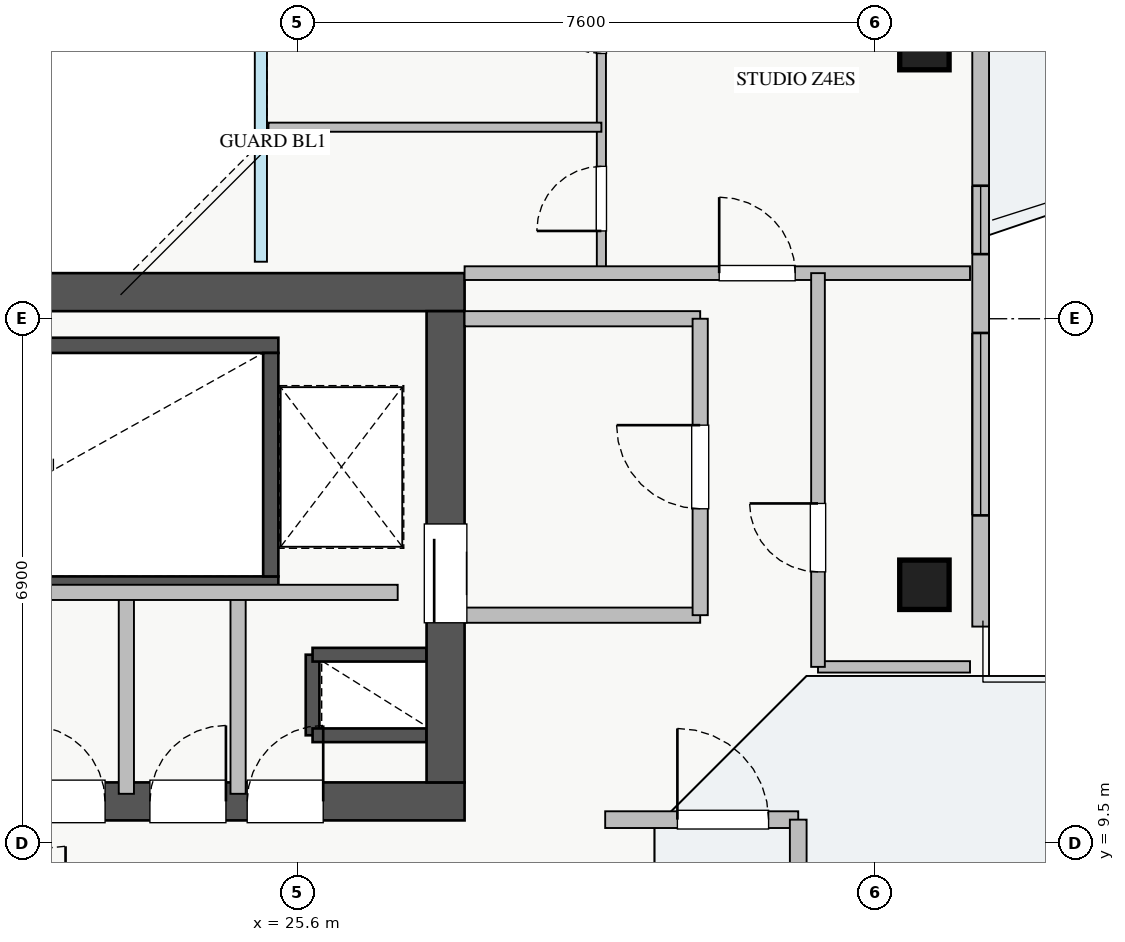
"""IFC4 building model, lengths in metres.
Left out: names, types, materials, properties, quantities, classifications, styles, units other than length and angle.
Written with IfcOpenShell. Run it as: python <this file> out.ifc"""

import sys

from ifc_helpers import new_model, si_unit, direction, frame, frame_2d, origin, origin_2d, place, context, subcontext, project, spatial, rectangle, extrude, source, transform, mapped, element, fill, save


model = new_model("IFC4")
c1 = context("Model", 3, precision=1e-05, world=origin(), true_north=direction((0.0, 1.0)))
c2 = subcontext(c1, "Body", "Model", "MODEL_VIEW")
j1 = project(units=[si_unit("LENGTHUNIT", "METRE"), si_unit("PLANEANGLEUNIT", "RADIAN")], contexts=[c1])
p1 = place(None, origin())
s1 = spatial("IfcSite", under=j1, at=p1, CompositionType="ELEMENT")
p2 = place(p1, origin())
s2 = spatial("IfcBuilding", under=s1, at=p2, CompositionType="ELEMENT")
p3 = place(p2, frame((0.0, 0.0, 253.5)))
s3 = spatial("IfcBuildingStorey", under=s2, at=p3, CompositionType="ELEMENT", Elevation=253.5)
p4 = place(p3, frame((25.8, 10.92, 0.0), z_axis=(0.0, 0.0, 1.0), x_axis=(0.0, 1.0, 0.0)))
e1 = element("IfcWall", 1, at=p4, inside=s3, PredefinedType="SHEAR", context=c2, shape_type="SweptSolid", body=[
    extrude(rectangle(XDim=1.06, YDim=0.18, at=frame_2d((0.53, 0.0))), origin(), (0.0, 0.0, 1.0), 3.07),
])
for number, where, z_axis, x_axis in (
    (2, (25.8, 11.98, 0.0), (0.0, 0.0, 1.0), (1.0, 0.0, 0.0)),
    (3, (25.8, 10.92, 0.0), (0.0, 0.0, 1.0), (1.0, 0.0, 0.0)),
):
    element("IfcWall", number, at=place(p3, frame(where, z_axis=z_axis, x_axis=x_axis)), inside=s3, PredefinedType="SHEAR", context=c2, shape_type="SweptSolid", body=[
        extrude(rectangle(XDim=1.5, YDim=0.18, at=frame_2d((0.75, 0.0))), origin(), (0.0, 0.0, 1.0), 3.07),
    ])
p5 = place(p3, frame((18.2, 12.91, 0.0), z_axis=(0.0, 0.0, 1.0), x_axis=(1.0, 0.0, 0.0)))
e4 = element("IfcWall", 4, at=p5, inside=s3, PredefinedType="SHEAR", context=c2, shape_type="SweptSolid", body=[
    extrude(rectangle(XDim=7.15, YDim=0.2, at=frame_2d((3.575, 0.0))), origin(), (0.0, 0.0, 1.0), 3.25),
])
p6 = place(p5, frame((0.35, 0.0, 0.0)))
e5 = element("IfcOpeningElement", 5, at=p6, cuts=e4, PredefinedType="OPENING", context=c2, shape_type="SweptSolid", body=[
    extrude(rectangle(XDim=1.1, YDim=2.05, at=frame_2d((0.55, 1.025))), frame((0.0, 0.11, 0.0), z_axis=(0.0, -1.0, 0.0), x_axis=(1.0, 0.0, 0.0)), (0.0, 0.0, 1.0), 0.22),
])
p7 = place(p3, frame((18.2, 16.05, 0.0), z_axis=(0.0, 0.0, 1.0), x_axis=(1.0, 0.0, 0.0)))
e6 = element("IfcWall", 6, at=p7, inside=s3, PredefinedType="SHEAR", context=c2, shape_type="SweptSolid", body=[
    extrude(rectangle(XDim=7.15, YDim=0.2, at=frame_2d((3.575, 0.0))), origin(), (0.0, 0.0, 1.0), 3.25),
])
p8 = place(p3, frame((25.25, 13.01, 0.0), z_axis=(0.0, 0.0, 1.0), x_axis=(0.0, 1.0, 0.0)))
e7 = element("IfcWall", 7, at=p8, inside=s3, PredefinedType="SHEAR", context=c2, shape_type="SweptSolid", body=[
    extrude(rectangle(XDim=2.94, YDim=0.2, at=frame_2d((1.47, 0.0))), origin(), (0.0, 0.0, 1.0), 3.25),
])
p9 = place(p3, frame((10.2, 10.05, 0.0), z_axis=(0.0, 0.0, 1.0), x_axis=(1.0, 0.0, 0.0)))
e8 = element("IfcWall", 8, at=p9, inside=s3, PredefinedType="SHEAR", context=c2, shape_type="SweptSolid", body=[
    extrude(rectangle(XDim=17.6, YDim=0.5, at=frame_2d((8.8, 0.0))), origin(), (0.0, 0.0, 1.0), 3.25),
])
p10 = place(p9, frame((1.15, 0.0, 0.0)))
e9 = element("IfcOpeningElement", 9, at=p10, cuts=e8, PredefinedType="OPENING", context=c2, shape_type="SweptSolid", body=[
    extrude(rectangle(XDim=1.1, YDim=2.05, at=frame_2d((0.55, 1.025))), frame((0.0, 0.26, 0.0), z_axis=(0.0, -1.0, 0.0), x_axis=(1.0, 0.0, 0.0)), (0.0, 0.0, 1.0), 0.52),
])
p11 = place(p9, frame((8.3, 0.0, 0.0)))
e10 = element("IfcOpeningElement", 10, at=p11, cuts=e8, PredefinedType="OPENING", context=c2, shape_type="SweptSolid", body=[
    extrude(rectangle(XDim=1.1, YDim=2.05, at=frame_2d((0.55, 1.025))), frame((0.0, 0.26, 0.0), z_axis=(0.0, -1.0, 0.0), x_axis=(1.0, 0.0, 0.0)), (0.0, 0.0, 1.0), 0.52),
])
p12 = place(p9, frame((2.85, 0.0, 0.0)))
e11 = element("IfcOpeningElement", 11, at=p12, cuts=e8, PredefinedType="OPENING", context=c2, shape_type="SweptSolid", body=[
    extrude(rectangle(XDim=1.1, YDim=2.05, at=frame_2d((0.55, 1.025))), frame((0.0, 0.26, 0.0), z_axis=(0.0, -1.0, 0.0), x_axis=(1.0, 0.0, 0.0)), (0.0, 0.0, 1.0), 0.52),
])
p13 = place(p9, frame((5.8, 0.0, 0.0)))
e12 = element("IfcOpeningElement", 12, at=p13, cuts=e8, PredefinedType="OPENING", context=c2, shape_type="SweptSolid", body=[
    extrude(rectangle(XDim=1.0, YDim=2.05, at=frame_2d((0.5, 1.025))), frame((0.0, 0.26, 0.0), z_axis=(0.0, -1.0, 0.0), x_axis=(1.0, 0.0, 0.0)), (0.0, 0.0, 1.0), 0.52),
])
p14 = place(p9, frame((14.74, 0.0, 0.0)))
e13 = element("IfcOpeningElement", 13, at=p14, cuts=e8, PredefinedType="OPENING", context=c2, shape_type="SweptSolid", body=[
    extrude(rectangle(XDim=1.0, YDim=2.05, at=frame_2d((0.5, 1.025))), frame((0.0, 0.26, 0.0), z_axis=(0.0, -1.0, 0.0), x_axis=(1.0, 0.0, 0.0)), (0.0, 0.0, 1.0), 0.52),
])
p15 = place(p9, frame((10.155, 0.0, 0.0)))
e14 = element("IfcOpeningElement", 14, at=p15, cuts=e8, PredefinedType="OPENING", context=c2, shape_type="SweptSolid", body=[
    extrude(rectangle(XDim=1.0, YDim=2.05, at=frame_2d((0.5, 1.025))), frame((0.0, 0.26, 0.0), z_axis=(0.0, -1.0, 0.0), x_axis=(1.0, 0.0, 0.0)), (0.0, 0.0, 1.0), 0.52),
])
p16 = place(p9, frame((11.87, 0.0, 0.0)))
e15 = element("IfcOpeningElement", 15, at=p16, cuts=e8, PredefinedType="OPENING", context=c2, shape_type="SweptSolid", body=[
    extrude(rectangle(XDim=1.0, YDim=2.05, at=frame_2d((0.5, 1.025))), frame((0.0, 0.26, 0.0), z_axis=(0.0, -1.0, 0.0), x_axis=(1.0, 0.0, 0.0)), (0.0, 0.0, 1.0), 0.52),
])
p17 = place(p9, frame((13.46, 0.0, 0.0)))
e16 = element("IfcOpeningElement", 16, at=p17, cuts=e8, PredefinedType="OPENING", context=c2, shape_type="SweptSolid", body=[
    extrude(rectangle(XDim=1.0, YDim=2.05, at=frame_2d((0.5, 1.025))), frame((0.0, 0.26, 0.0), z_axis=(0.0, -1.0, 0.0), x_axis=(1.0, 0.0, 0.0)), (0.0, 0.0, 1.0), 0.52),
])
p18 = place(p3, frame((10.2, 16.75, 0.0), z_axis=(0.0, 0.0, 1.0), x_axis=(1.0, 0.0, 0.0)))
e17 = element("IfcWall", 17, at=p18, inside=s3, PredefinedType="SHEAR", context=c2, shape_type="SweptSolid", body=[
    extrude(rectangle(XDim=17.6, YDim=0.5, at=frame_2d((8.8, 0.0))), origin(), (0.0, 0.0, 1.0), 3.25),
])
p19 = place(p3, frame((27.55, 10.3, 0.0), z_axis=(0.0, 0.0, 1.0), x_axis=(0.0, 1.0, 0.0)))
e18 = element("IfcWall", 18, at=p19, inside=s3, PredefinedType="SHEAR", context=c2, shape_type="SweptSolid", body=[
    extrude(rectangle(XDim=6.2, YDim=0.5, at=frame_2d((3.1, 0.0))), origin(), (0.0, 0.0, 1.0), 3.25),
])
p20 = place(p19, frame((2.1, 0.0, 0.0)))
e19 = element("IfcOpeningElement", 19, at=p20, cuts=e18, PredefinedType="OPENING", context=c2, shape_type="SweptSolid", body=[
    extrude(rectangle(XDim=1.3, YDim=2.05, at=frame_2d((0.65, 1.025))), frame((0.0, 0.26, 0.0), z_axis=(0.0, -1.0, 0.0), x_axis=(1.0, 0.0, 0.0)), (0.0, 0.0, 1.0), 0.52),
])
m1 = source(origin(), c2, "Body", "SweptSolid", [
    extrude(rectangle(XDim=0.65, YDim=0.65, at=origin_2d()), origin(), (0.0, 0.0, 1.0), 3.25),
])
for number, where, z_axis, x_axis in (
    (20, (33.85, 12.9, 0.0), (0.0, 0.0, 1.0), (1.0, 0.0, 0.0)),
    (21, (33.85, 20.0, 0.0), (0.0, 0.0, 1.0), (1.0, 0.0, 0.0)),
):
    element("IfcColumn", number, at=place(p3, frame(where, z_axis=z_axis, x_axis=x_axis)), inside=s3, PredefinedType="COLUMN", context=c2, shape_type="MappedRepresentation", body=[
        mapped(m1, transform((0.0, 0.0, 0.0), x_axis=(1.0, 0.0, 0.0), y_axis=(0.0, 1.0, 0.0), z_axis=(0.0, 0.0, 1.0), scale=1.0)),
    ])
p21 = place(p3, frame((34.59, 12.35, 0.0), z_axis=(0.0, 0.0, 1.0), x_axis=(0.0, 1.0, 0.0)))
e22 = element("IfcWall", 22, at=p21, inside=s3, PredefinedType="STANDARD", context=c2, shape_type="SweptSolid", body=[
    extrude(rectangle(XDim=21.3, YDim=0.22, at=frame_2d((10.65, 0.0))), origin(), (0.0, 0.0, 1.0), 2.61),
])
p22 = place(p21, frame((11.5, 0.0, 0.0)))
e23 = element("IfcOpeningElement", 23, at=p22, cuts=e22, PredefinedType="OPENING", context=c2, shape_type="SweptSolid", body=[
    extrude(rectangle(XDim=1.2, YDim=2.1, at=frame_2d((0.6, 1.05))), frame((0.0, 0.12, 0.0), z_axis=(0.0, -1.0, 0.0), x_axis=(1.0, 0.0, 0.0)), (0.0, 0.0, 1.0), 0.24),
])
p23 = place(p21, frame((1.463, 0.0, 0.9)))
e24 = element("IfcOpeningElement", 24, at=p23, cuts=e22, PredefinedType="OPENING", context=c2, shape_type="SweptSolid", body=[
    extrude(rectangle(XDim=2.4, YDim=1.48, at=frame_2d((1.2, 0.74))), frame((0.0, 0.12, 0.0), z_axis=(0.0, -1.0, 0.0), x_axis=(1.0, 0.0, 0.0)), (0.0, 0.0, 1.0), 0.24),
])
p24 = place(p21, frame((17.588, 0.0, 0.9)))
e25 = element("IfcOpeningElement", 25, at=p24, cuts=e22, PredefinedType="OPENING", context=c2, shape_type="SweptSolid", body=[
    extrude(rectangle(XDim=2.1, YDim=1.48, at=frame_2d((1.05, 0.74))), frame((0.0, 0.12, 0.0), z_axis=(0.0, -1.0, 0.0), x_axis=(1.0, 0.0, 0.0)), (0.0, 0.0, 1.0), 0.24),
])
p25 = place(p21, frame((4.9, 0.0, 0.9)))
e26 = element("IfcOpeningElement", 26, at=p25, cuts=e22, PredefinedType="OPENING", context=c2, shape_type="SweptSolid", body=[
    extrude(rectangle(XDim=0.9, YDim=1.2, at=frame_2d((0.45, 0.6))), frame((0.0, 0.12, 0.0), z_axis=(0.0, -1.0, 0.0), x_axis=(1.0, 0.0, 0.0)), (0.0, 0.0, 1.0), 0.24),
])
p26 = place(p21, frame((9.685, 0.0, 0.9)))
e27 = element("IfcOpeningElement", 27, at=p26, cuts=e22, PredefinedType="OPENING", context=c2, shape_type="SweptSolid", body=[
    extrude(rectangle(XDim=0.9, YDim=1.2, at=frame_2d((0.45, 0.6))), frame((0.0, 0.12, 0.0), z_axis=(0.0, -1.0, 0.0), x_axis=(1.0, 0.0, 0.0)), (0.0, 0.0, 1.0), 0.24),
])
p27 = place(p3, frame((29.65, 9.81, 0.0), z_axis=(0.0, 0.0, 1.0), x_axis=(1.0, 0.0, 0.0)))
e28 = element("IfcWall", 28, at=p27, inside=s3, PredefinedType="STANDARD", context=c2, shape_type="SweptSolid", body=[
    extrude(rectangle(XDim=2.54, YDim=0.22, at=frame_2d((1.27, 0.0))), origin(), (0.0, 0.0, 1.0), 2.61),
])
p28 = place(p27, frame((0.95, 0.0, 0.0)))
e29 = element("IfcOpeningElement", 29, at=p28, cuts=e28, PredefinedType="OPENING", context=c2, shape_type="SweptSolid", body=[
    extrude(rectangle(XDim=1.2, YDim=2.1, at=frame_2d((0.6, 1.05))), frame((0.0, 0.12, 0.0), z_axis=(0.0, -1.0, 0.0), x_axis=(1.0, 0.0, 0.0)), (0.0, 0.0, 1.0), 0.24),
])
p29 = place(p3, frame((32.19, 7.15, 0.0), z_axis=(0.0, 0.0, 1.0), x_axis=(0.0, 1.0, 0.0)))
e30 = element("IfcWall", 30, at=p29, inside=s3, PredefinedType="STANDARD", context=c2, shape_type="SweptSolid", body=[
    extrude(rectangle(XDim=2.66, YDim=0.22, at=frame_2d((1.33, 0.0))), origin(), (0.0, 0.0, 1.0), 2.61),
])
for number, where, z_axis, x_axis in (
    (31, (27.8, 16.4, 0.0), (0.0, 0.0, 1.0), (1.0, 0.0, 0.0)),
    (32, (27.8, 12.5, 0.0), (0.0, 0.0, 1.0), (1.0, 0.0, 0.0)),
):
    element("IfcWall", number, at=place(p3, frame(where, z_axis=z_axis, x_axis=x_axis)), inside=s3, PredefinedType="PARTITIONING", context=c2, shape_type="SweptSolid", body=[
        extrude(rectangle(XDim=3.1, YDim=0.2, at=frame_2d((1.55, 0.0))), origin(), (0.0, 0.0, 1.0), 3.07),
    ])
p30 = place(p3, frame((30.9, 12.5, 0.0), z_axis=(0.0, 0.0, 1.0), x_axis=(0.0, 1.0, 0.0)))
e33 = element("IfcWall", 33, at=p30, inside=s3, PredefinedType="PARTITIONING", context=c2, shape_type="SweptSolid", body=[
    extrude(rectangle(XDim=3.9, YDim=0.2, at=frame_2d((1.95, 0.0))), origin(), (0.0, 0.0, 1.0), 2.771),
])
p31 = place(p30, frame((1.4, 0.0, 0.0)))
e34 = element("IfcOpeningElement", 34, at=p31, cuts=e33, PredefinedType="OPENING", context=c2, shape_type="SweptSolid", body=[
    extrude(rectangle(XDim=1.1, YDim=2.05, at=frame_2d((0.55, 1.025))), frame((0.0, 0.11, 0.0), z_axis=(0.0, -1.0, 0.0), x_axis=(1.0, 0.0, 0.0)), (0.0, 0.0, 1.0), 0.22),
])
for number, where, z_axis, x_axis in (
    (35, (24.82, 10.15, 0.0), (0.0, 0.0, 1.0), (0.0, 1.0, 0.0)),
    (36, (23.35, 10.15, 0.0), (0.0, 0.0, 1.0), (0.0, 1.0, 0.0)),
):
    element("IfcWall", number, at=place(p3, frame(where, z_axis=z_axis, x_axis=x_axis)), inside=s3, PredefinedType="PARTITIONING", context=c2, shape_type="SweptSolid", body=[
        extrude(rectangle(XDim=2.65, YDim=0.2, at=frame_2d((1.325, 0.0))), origin(), (0.0, 0.0, 1.0), 3.07),
    ])
p32 = place(p3, frame((21.75, 12.8, 0.0), z_axis=(0.0, 0.0, 1.0), x_axis=(1.0, 0.0, 0.0)))
e37 = element("IfcWall", 37, at=p32, inside=s3, PredefinedType="PARTITIONING", context=c2, shape_type="SweptSolid", body=[
    extrude(rectangle(XDim=5.17, YDim=0.2, at=frame_2d((2.585, 0.0))), origin(), (0.0, 0.0, 1.0), 3.07),
])
p33 = place(p3, frame((29.6, 17.0, 0.0), z_axis=(0.0, 0.0, 1.0), x_axis=(0.0, 1.0, 0.0)))
e38 = element("IfcWall", 38, at=p33, inside=s3, PredefinedType="PLUMBINGWALL", context=c2, shape_type="SweptSolid", body=[
    extrude(rectangle(XDim=4.8, YDim=0.12, at=frame_2d((2.4, 0.0))), origin(), (0.0, 0.0, 1.0), 3.07),
])
p34 = place(p33, frame((0.555, 0.0, 0.0)))
e39 = element("IfcOpeningElement", 39, at=p34, cuts=e38, PredefinedType="OPENING", context=c2, shape_type="SweptSolid", body=[
    extrude(rectangle(XDim=0.85, YDim=2.05, at=frame_2d((0.425, 1.025))), frame((0.0, 0.07, 0.0), z_axis=(0.0, -1.0, 0.0), x_axis=(1.0, 0.0, 0.0)), (0.0, 0.0, 1.0), 0.14),
])
p35 = place(p33, frame((2.89, 0.0, 0.0)))
e40 = element("IfcOpeningElement", 40, at=p35, cuts=e38, PredefinedType="OPENING", context=c2, shape_type="SweptSolid", body=[
    extrude(rectangle(XDim=0.9, YDim=2.05, at=frame_2d((0.45, 1.025))), frame((0.0, 0.07, 0.0), z_axis=(0.0, -1.0, 0.0), x_axis=(1.0, 0.0, 0.0)), (0.0, 0.0, 1.0), 0.14),
])
p36 = place(p3, frame((25.22, 18.92, 0.0), z_axis=(0.0, 0.0, 1.0), x_axis=(1.0, 0.0, 0.0)))
e41 = element("IfcWall", 41, at=p36, inside=s3, PredefinedType="PLUMBINGWALL", context=c2, shape_type="SweptSolid", body=[
    extrude(rectangle(XDim=4.38, YDim=0.12, at=frame_2d((2.19, 0.0))), origin(), (0.0, 0.0, 1.0), 3.07),
])
p37 = place(p3, frame((27.8, 17.0, 0.0), z_axis=(0.0, 0.0, 1.0), x_axis=(1.0, 0.0, 0.0)))
e42 = element("IfcWall", 42, at=p37, inside=s3, PredefinedType="PARTITIONING", context=c2, shape_type="SweptSolid", body=[
    extrude(rectangle(XDim=6.65, YDim=0.18, at=frame_2d((3.325, 0.0))), origin(), (0.0, 0.0, 1.0), 3.07),
])
p38 = place(p37, frame((3.35, 0.0, 0.0)))
e43 = element("IfcOpeningElement", 43, at=p38, cuts=e42, PredefinedType="OPENING", context=c2, shape_type="SweptSolid", body=[
    extrude(rectangle(XDim=1.0, YDim=2.05, at=frame_2d((0.5, 1.025))), frame((0.0, 0.1, 0.0), z_axis=(0.0, -1.0, 0.0), x_axis=(1.0, 0.0, 0.0)), (0.0, 0.0, 1.0), 0.2),
])
p39 = place(p3, frame((32.45, 11.82, 0.0), z_axis=(0.0, 0.0, 1.0), x_axis=(1.0, 0.0, 0.0)))
e44 = element("IfcWall", 44, at=p39, inside=s3, PredefinedType="PARTITIONING", context=c2, shape_type="SweptSolid", body=[
    extrude(rectangle(XDim=2.0, YDim=0.15, at=frame_2d((1.0, 0.0))), origin(), (0.0, 0.0, 1.0), 3.07),
])
p40 = place(p3, frame((32.45, 11.82, 0.0), z_axis=(0.0, 0.0, 1.0), x_axis=(0.0, 1.0, 0.0)))
e45 = element("IfcWall", 45, at=p40, inside=s3, PredefinedType="PARTITIONING", context=c2, shape_type="SweptSolid", body=[
    extrude(rectangle(XDim=5.18, YDim=0.18, at=frame_2d((2.59, 0.0))), origin(), (0.0, 0.0, 1.0), 3.07),
])
p41 = place(p40, frame((1.25, 0.0, 0.0)))
e46 = element("IfcOpeningElement", 46, at=p41, cuts=e45, PredefinedType="OPENING", context=c2, shape_type="SweptSolid", body=[
    extrude(rectangle(XDim=0.9, YDim=2.05, at=frame_2d((0.45, 1.025))), frame((0.0, 0.1, 0.0), z_axis=(0.0, -1.0, 0.0), x_axis=(1.0, 0.0, 0.0)), (0.0, 0.0, 1.0), 0.2),
])
m2 = source(origin(), c2, "Body", "SweptSolid", [
    extrude(rectangle(XDim=2.4, YDim=1.48, at=frame_2d((1.2, 0.74))), frame((0.0, 0.03, 0.0), z_axis=(0.0, -1.0, 0.0), x_axis=(1.0, 0.0, 0.0)), (0.0, 0.0, 1.0), 0.06),
])
p42 = place(p23, origin())
e47 = element("IfcWindow", 47, at=p42, inside=s3, PartitioningType="TRIPLE_PANEL_VERTICAL", PredefinedType="WINDOW", context=c2, shape_type="MappedRepresentation", body=[
    mapped(m2, transform((0.0, 0.0, 0.0), x_axis=(1.0, 0.0, 0.0), y_axis=(0.0, 1.0, 0.0), z_axis=(0.0, 0.0, 1.0), scale=1.0)),
])
fill(e24, e47)
m3 = source(origin(), c2, "Body", "SweptSolid", [
    extrude(rectangle(XDim=1.2, YDim=2.1, at=frame_2d((0.6, 1.05))), frame((0.0, 0.025, 0.0), z_axis=(0.0, -1.0, 0.0), x_axis=(1.0, 0.0, 0.0)), (0.0, 0.0, 1.0), 0.05),
])
p43 = place(p28, origin())
e48 = element("IfcDoor", 48, at=p43, inside=s3, OperationType="SINGLE_SWING_LEFT", PredefinedType="DOOR", context=c2, shape_type="MappedRepresentation", body=[
    mapped(m3, transform((0.0, 0.0, 0.0), x_axis=(1.0, 0.0, 0.0), y_axis=(0.0, 1.0, 0.0), z_axis=(0.0, 0.0, 1.0), scale=1.0)),
])
fill(e29, e48)
m4 = source(origin(), c2, "Body", "SweptSolid", [
    extrude(rectangle(XDim=1.3, YDim=2.05, at=frame_2d((0.65, 1.025))), frame((0.0, 0.025, 0.0), z_axis=(0.0, -1.0, 0.0), x_axis=(1.0, 0.0, 0.0)), (0.0, 0.0, 1.0), 0.05),
])
p44 = place(p20, origin())
e49 = element("IfcDoor", 49, at=p44, inside=s3, OperationType="SLIDING_TO_RIGHT", PredefinedType="DOOR", context=c2, shape_type="MappedRepresentation", body=[
    mapped(m4, transform((0.0, 0.0, 0.0), x_axis=(1.0, 0.0, 0.0), y_axis=(0.0, 1.0, 0.0), z_axis=(0.0, 0.0, 1.0), scale=1.0)),
])
fill(e19, e49)
m5 = source(origin(), c2, "Body", "SweptSolid", [
    extrude(rectangle(XDim=1.0, YDim=2.05, at=frame_2d((0.5, 1.025))), frame((0.0, 0.025, 0.0), z_axis=(0.0, -1.0, 0.0), x_axis=(1.0, 0.0, 0.0)), (0.0, 0.0, 1.0), 0.05),
])
p45 = place(p14, origin())
e50 = element("IfcDoor", 50, at=p45, inside=s3, OperationType="SINGLE_SWING_RIGHT", PredefinedType="DOOR", context=c2, shape_type="MappedRepresentation", body=[
    mapped(m5, transform((0.0, 0.0, 0.0), x_axis=(1.0, 0.0, 0.0), y_axis=(0.0, 1.0, 0.0), z_axis=(0.0, 0.0, 1.0), scale=1.0)),
])
fill(e13, e50)
p46 = place(p16, origin())
e51 = element("IfcDoor", 51, at=p46, inside=s3, OperationType="SINGLE_SWING_LEFT", PredefinedType="DOOR", context=c2, shape_type="MappedRepresentation", body=[
    mapped(m5, transform((0.0, 0.0, 0.0), x_axis=(1.0, 0.0, 0.0), y_axis=(0.0, 1.0, 0.0), z_axis=(0.0, 0.0, 1.0), scale=1.0)),
])
fill(e15, e51)
p47 = place(p17, origin())
e52 = element("IfcDoor", 52, at=p47, inside=s3, OperationType="SINGLE_SWING_RIGHT", PredefinedType="DOOR", context=c2, shape_type="MappedRepresentation", body=[
    mapped(m5, transform((0.0, 0.0, 0.0), x_axis=(1.0, 0.0, 0.0), y_axis=(0.0, 1.0, 0.0), z_axis=(0.0, 0.0, 1.0), scale=1.0)),
])
fill(e16, e52)
m6 = source(origin(), c2, "Body", "SweptSolid", [
    extrude(rectangle(XDim=1.1, YDim=2.05, at=frame_2d((0.55, 1.025))), frame((0.0, 0.025, 0.0), z_axis=(0.0, -1.0, 0.0), x_axis=(1.0, 0.0, 0.0)), (0.0, 0.0, 1.0), 0.05),
])
p48 = place(p31, origin())
e53 = element("IfcDoor", 53, at=p48, inside=s3, OperationType="SINGLE_SWING_RIGHT", PredefinedType="DOOR", context=c2, shape_type="MappedRepresentation", body=[
    mapped(m6, transform((0.0, 0.0, 0.0), x_axis=(1.0, 0.0, 0.0), y_axis=(0.0, 1.0, 0.0), z_axis=(0.0, 0.0, 1.0), scale=1.0)),
])
fill(e34, e53)
m7 = source(origin(), c2, "Body", "SweptSolid", [
    extrude(rectangle(XDim=0.85, YDim=2.05, at=frame_2d((0.425, 1.025))), frame((0.0, 0.025, 0.0), z_axis=(0.0, -1.0, 0.0), x_axis=(1.0, 0.0, 0.0)), (0.0, 0.0, 1.0), 0.05),
])
p49 = place(p34, origin())
e54 = element("IfcDoor", 54, at=p49, inside=s3, OperationType="SINGLE_SWING_LEFT", PredefinedType="DOOR", context=c2, shape_type="MappedRepresentation", body=[
    mapped(m7, transform((0.0, 0.0, 0.0), x_axis=(1.0, 0.0, 0.0), y_axis=(0.0, 1.0, 0.0), z_axis=(0.0, 0.0, 1.0), scale=1.0)),
])
fill(e39, e54)
m8 = source(origin(), c2, "Body", "SweptSolid", [
    extrude(rectangle(XDim=0.9, YDim=2.05, at=frame_2d((0.45, 1.025))), frame((0.0, 0.025, 0.0), z_axis=(0.0, -1.0, 0.0), x_axis=(1.0, 0.0, 0.0)), (0.0, 0.0, 1.0), 0.05),
])
p50 = place(p35, origin())
e55 = element("IfcDoor", 55, at=p50, inside=s3, OperationType="SINGLE_SWING_RIGHT", PredefinedType="DOOR", context=c2, shape_type="MappedRepresentation", body=[
    mapped(m8, transform((0.0, 0.0, 0.0), x_axis=(1.0, 0.0, 0.0), y_axis=(0.0, 1.0, 0.0), z_axis=(0.0, 0.0, 1.0), scale=1.0)),
])
fill(e40, e55)
p51 = place(p38, origin())
e56 = element("IfcDoor", 56, at=p51, inside=s3, OperationType="SINGLE_SWING_LEFT", PredefinedType="DOOR", context=c2, shape_type="MappedRepresentation", body=[
    mapped(m5, transform((0.0, 0.0, 0.0), x_axis=(1.0, 0.0, 0.0), y_axis=(0.0, 1.0, 0.0), z_axis=(0.0, 0.0, 1.0), scale=1.0)),
])
fill(e43, e56)
p52 = place(p41, origin())
e57 = element("IfcDoor", 57, at=p52, inside=s3, OperationType="SINGLE_SWING_RIGHT", PredefinedType="DOOR", context=c2, shape_type="MappedRepresentation", body=[
    mapped(m8, transform((0.0, 0.0, 0.0), x_axis=(1.0, 0.0, 0.0), y_axis=(0.0, 1.0, 0.0), z_axis=(0.0, 0.0, 1.0), scale=1.0)),
])
fill(e46, e57)
m9 = source(origin(), c2, "Body", "SweptSolid", [
    extrude(rectangle(XDim=0.9, YDim=1.2, at=frame_2d((0.45, 0.6))), frame((0.0, 0.03, 0.0), z_axis=(0.0, -1.0, 0.0), x_axis=(1.0, 0.0, 0.0)), (0.0, 0.0, 1.0), 0.06),
])
p53 = place(p25, origin())
e58 = element("IfcWindow", 58, at=p53, inside=s3, PartitioningType="SINGLE_PANEL", PredefinedType="WINDOW", context=c2, shape_type="MappedRepresentation", body=[
    mapped(m9, transform((0.0, 0.0, 0.0), x_axis=(1.0, 0.0, 0.0), y_axis=(0.0, 1.0, 0.0), z_axis=(0.0, 0.0, 1.0), scale=1.0)),
])
fill(e26, e58)
save(model, sys.argv[1])
